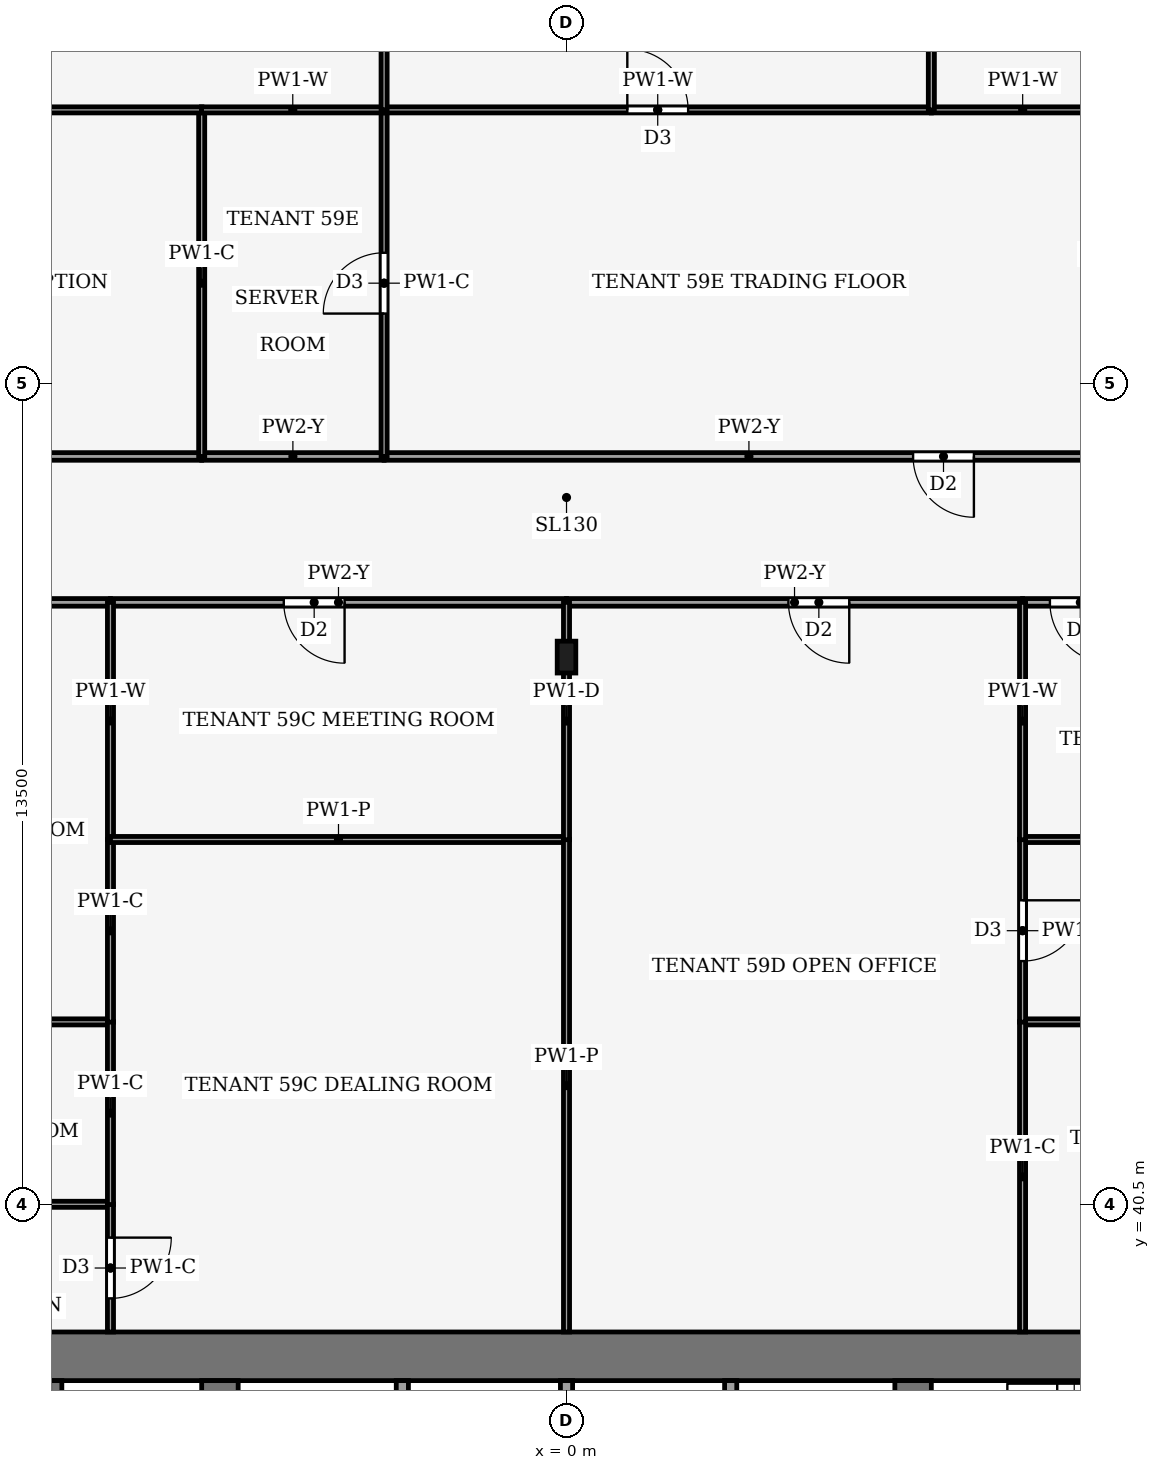
"""IFC4 building model, lengths in metres.
Left out: names, types, materials, properties, quantities, classifications, styles, units other than length and angle.
Written with IfcOpenShell. Run it as: python <this file> out.ifc"""

import sys

from ifc_helpers import new_model, si_unit, direction, frame, frame_2d, origin, origin_2d, place, context, subcontext, project, spatial, rectangle, i_section, extrude, element, fill, save


model = new_model("IFC4")
c1 = context("Model", 3, precision=1e-05, world=origin(), true_north=direction((0.0, 1.0)))
c2 = subcontext(c1, "Body", "Model", "MODEL_VIEW")
j1 = project(units=[si_unit("LENGTHUNIT", "METRE"), si_unit("PLANEANGLEUNIT", "RADIAN")], contexts=[c1])
p1 = place(None, origin())
s1 = spatial("IfcSite", under=j1, at=p1, CompositionType="ELEMENT")
p2 = place(p1, origin())
s2 = spatial("IfcBuilding", under=s1, at=p2, CompositionType="ELEMENT")
p3 = place(p2, frame((0.0, 0.0, 258.0)))
s3 = spatial("IfcBuildingStorey", under=s2, at=p3, CompositionType="ELEMENT", Elevation=258.0)
p4 = place(p3, frame((-13.4, 38.0, -0.13), z_axis=(0.0, 0.0, 1.0), x_axis=(1.0, 0.0, 0.0)))
e1 = element("IfcWall", 1, at=p4, inside=s3, PredefinedType="SHEAR", context=c2, shape_type="SweptSolid", body=[
    extrude(rectangle(XDim=26.8, YDim=0.8, at=frame_2d((13.4, 0.0))), origin(), (0.0, 0.0, 1.0), 4.0),
])
p5 = place(p3, frame((-5.7, 18.4, -0.13), z_axis=(0.0, 0.0, 1.0), x_axis=(0.0, 1.0, 0.0)))
e2 = element("IfcWall", 2, at=p5, inside=s3, PredefinedType="SHEAR", context=c2, shape_type="SweptSolid", body=[
    extrude(rectangle(XDim=19.2, YDim=0.6, at=frame_2d((9.6, 0.0))), origin(), (0.0, 0.0, 1.0), 4.0),
])
p6 = place(p5, frame((8.35, 0.0, 0.13)))
e3 = element("IfcOpeningElement", 3, at=p6, cuts=e2, PredefinedType="OPENING", context=c2, shape_type="SweptSolid", body=[
    extrude(rectangle(XDim=0.9, YDim=2.1, at=frame_2d((0.45, 1.05))), frame((0.0, 0.31, 0.0), z_axis=(0.0, -1.0, 0.0), x_axis=(1.0, 0.0, 0.0)), (0.0, 0.0, 1.0), 0.62),
])
p7 = place(p3, frame((5.7, 18.4, -0.13), z_axis=(0.0, 0.0, 1.0), x_axis=(0.0, 1.0, 0.0)))
e4 = element("IfcWall", 4, at=p7, inside=s3, PredefinedType="SHEAR", context=c2, shape_type="SweptSolid", body=[
    extrude(rectangle(XDim=19.2, YDim=0.6, at=frame_2d((9.6, 0.0))), origin(), (0.0, 0.0, 1.0), 4.0),
])
p8 = place(p7, frame((8.35, 0.0, 0.13)))
e5 = element("IfcOpeningElement", 5, at=p8, cuts=e4, PredefinedType="OPENING", context=c2, shape_type="SweptSolid", body=[
    extrude(rectangle(XDim=0.9, YDim=2.1, at=frame_2d((0.45, 1.05))), frame((0.0, 0.31, 0.0), z_axis=(0.0, -1.0, 0.0), x_axis=(1.0, 0.0, 0.0)), (0.0, 0.0, 1.0), 0.62),
])
p9 = place(p7, frame((13.3, 0.0, 0.13)))
e6 = element("IfcOpeningElement", 6, at=p9, cuts=e4, PredefinedType="OPENING", context=c2, shape_type="SweptSolid", body=[
    extrude(rectangle(XDim=2.4, YDim=2.4, at=frame_2d((1.2, 1.2))), frame((0.0, 0.31, 0.0), z_axis=(0.0, -1.0, 0.0), x_axis=(1.0, 0.0, 0.0)), (0.0, 0.0, 1.0), 0.62),
])
p10 = place(p3, frame((0.0, 49.5, 0.0), z_axis=(0.0, 0.0, 1.0), x_axis=(1.0, 0.0, 0.0)))
e7 = element("IfcColumn", 7, at=p10, inside=s3, PredefinedType="COLUMN", context=c2, shape_type="SweptSolid", body=[
    extrude(i_section(OverallWidth=0.306, OverallDepth=0.524, WebThickness=0.012, FlangeThickness=0.04, FilletRadius=0.027, at=origin_2d()), origin(), (0.0, 0.0, 1.0), 4.0),
])
for number, where, z_axis, x_axis in (
    (8, (-8.4, 34.0, 0.0), (0.0, 0.0, 1.0), (0.0, 1.0, 0.0)),
    (9, (-2.7, 34.0, 0.0), (0.0, 0.0, 1.0), (0.0, 1.0, 0.0)),
    (10, (0.0, 34.0, 0.0), (0.0, 0.0, 1.0), (0.0, 1.0, 0.0)),
    (11, (2.7, 34.0, 0.0), (0.0, 0.0, 1.0), (0.0, 1.0, 0.0)),
):
    element("IfcWall", number, at=place(p3, frame(where, z_axis=z_axis, x_axis=x_axis)), inside=s3, PredefinedType="PARTITIONING", context=c2, shape_type="SweptSolid", body=[
        extrude(rectangle(XDim=3.6, YDim=0.2, at=frame_2d((1.8, 0.0))), origin(), (0.0, 0.0, 1.0), 3.87),
    ])
p11 = place(p3, frame((-7.5, 50.4, 0.0), z_axis=(0.0, 0.0, 1.0), x_axis=(-1.0, 0.0, 0.0)))
e12 = element("IfcWall", 12, at=p11, inside=s3, PredefinedType="PARTITIONING", context=c2, shape_type="SweptSolid", body=[
    extrude(rectangle(XDim=5.9, YDim=0.125, at=frame_2d((2.95, 0.0))), origin(), (0.0, 0.0, 1.0), 3.24),
])
p12 = place(p3, frame((0.0, 50.4, 0.0), z_axis=(0.0, 0.0, 1.0), x_axis=(-1.0, 0.0, 0.0)))
e13 = element("IfcWall", 13, at=p12, inside=s3, PredefinedType="PARTITIONING", context=c2, shape_type="SweptSolid", body=[
    extrude(rectangle(XDim=7.5, YDim=0.125, at=frame_2d((3.75, 0.0))), origin(), (0.0, 0.0, 1.0), 3.24),
])
p13 = place(p12, frame((3.65, 0.0, 0.0)))
e14 = element("IfcOpeningElement", 14, at=p13, cuts=e13, PredefinedType="OPENING", context=c2, shape_type="SweptSolid", body=[
    extrude(rectangle(XDim=1.0, YDim=2.1, at=frame_2d((0.5, 1.05))), frame((0.0, 0.073, 0.0), z_axis=(0.0, -1.0, 0.0), x_axis=(1.0, 0.0, 0.0)), (0.0, 0.0, 1.0), 0.145),
])
p14 = place(p3, frame((13.4, 50.4, 0.0), z_axis=(0.0, 0.0, 1.0), x_axis=(-1.0, 0.0, 0.0)))
e15 = element("IfcWall", 15, at=p14, inside=s3, PredefinedType="PARTITIONING", context=c2, shape_type="SweptSolid", body=[
    extrude(rectangle(XDim=5.9, YDim=0.125, at=frame_2d((2.95, 0.0))), origin(), (0.0, 0.0, 1.0), 3.24),
])
p15 = place(p14, frame((4.45, 0.0, 0.0)))
e16 = element("IfcOpeningElement", 16, at=p15, cuts=e15, PredefinedType="OPENING", context=c2, shape_type="SweptSolid", body=[
    extrude(rectangle(XDim=1.0, YDim=2.1, at=frame_2d((0.5, 1.05))), frame((0.0, 0.073, 0.0), z_axis=(0.0, -1.0, 0.0), x_axis=(1.0, 0.0, 0.0)), (0.0, 0.0, 1.0), 0.145),
])
p16 = place(p3, frame((7.5, 50.4, 0.0), z_axis=(0.0, 0.0, 1.0), x_axis=(-1.0, 0.0, 0.0)))
e17 = element("IfcWall", 17, at=p16, inside=s3, PredefinedType="PARTITIONING", context=c2, shape_type="SweptSolid", body=[
    extrude(rectangle(XDim=7.5, YDim=0.125, at=frame_2d((3.75, 0.0))), origin(), (0.0, 0.0, 1.0), 3.24),
])
p17 = place(p16, frame((2.85, 0.0, 0.0)))
e18 = element("IfcOpeningElement", 18, at=p17, cuts=e17, PredefinedType="OPENING", context=c2, shape_type="SweptSolid", body=[
    extrude(rectangle(XDim=1.0, YDim=2.1, at=frame_2d((0.5, 1.05))), frame((0.0, 0.073, 0.0), z_axis=(0.0, -1.0, 0.0), x_axis=(1.0, 0.0, 0.0)), (0.0, 0.0, 1.0), 0.145),
])
p18 = place(p3, frame((-13.4, 52.8, 0.0), z_axis=(0.0, 0.0, 1.0), x_axis=(1.0, 0.0, 0.0)))
e19 = element("IfcWall", 19, at=p18, inside=s3, PredefinedType="PARTITIONING", context=c2, shape_type="SweptSolid", body=[
    extrude(rectangle(XDim=7.4, YDim=0.125, at=frame_2d((3.7, 0.0))), origin(), (0.0, 0.0, 1.0), 3.24),
])
p19 = place(p18, frame((3.2, 0.0, 0.0)))
e20 = element("IfcOpeningElement", 20, at=p19, cuts=e19, PredefinedType="OPENING", context=c2, shape_type="SweptSolid", body=[
    extrude(rectangle(XDim=1.0, YDim=2.1, at=frame_2d((0.5, 1.05))), frame((0.0, 0.073, 0.0), z_axis=(0.0, -1.0, 0.0), x_axis=(1.0, 0.0, 0.0)), (0.0, 0.0, 1.0), 0.145),
])
p20 = place(p3, frame((-3.0, 52.8, 0.0), z_axis=(0.0, 0.0, 1.0), x_axis=(-1.0, 0.0, 0.0)))
e21 = element("IfcWall", 21, at=p20, inside=s3, PredefinedType="PARTITIONING", context=c2, shape_type="SweptSolid", body=[
    extrude(rectangle(XDim=3.0, YDim=0.125, at=frame_2d((1.5, 0.0))), origin(), (0.0, 0.0, 1.0), 3.24),
])
p21 = place(p3, frame((9.0, 52.8, 0.0), z_axis=(0.0, 0.0, 1.0), x_axis=(-1.0, 0.0, 0.0)))
e22 = element("IfcWall", 22, at=p21, inside=s3, PredefinedType="PARTITIONING", context=c2, shape_type="SweptSolid", body=[
    extrude(rectangle(XDim=12.0, YDim=0.125, at=frame_2d((6.0, 0.0))), origin(), (0.0, 0.0, 1.0), 3.24),
])
p22 = place(p21, frame((2.3, 0.0, 0.0)))
e23 = element("IfcOpeningElement", 23, at=p22, cuts=e22, PredefinedType="OPENING", context=c2, shape_type="SweptSolid", body=[
    extrude(rectangle(XDim=1.0, YDim=2.1, at=frame_2d((0.5, 1.05))), frame((0.0, 0.073, 0.0), z_axis=(0.0, -1.0, 0.0), x_axis=(1.0, 0.0, 0.0)), (0.0, 0.0, 1.0), 0.145),
])
p23 = place(p3, frame((-13.4, 40.5, 0.0), z_axis=(0.0, 0.0, 1.0), x_axis=(1.0, 0.0, 0.0)))
e24 = element("IfcWall", 24, at=p23, inside=s3, PredefinedType="PARTITIONING", context=c2, shape_type="SweptSolid", body=[
    extrude(rectangle(XDim=5.9, YDim=0.1, at=frame_2d((2.95, 0.0))), origin(), (0.0, 0.0, 1.0), 3.44),
])
p24 = place(p23, frame((2.45, 0.0, 0.0)))
e25 = element("IfcOpeningElement", 25, at=p24, cuts=e24, PredefinedType="OPENING", context=c2, shape_type="SweptSolid", body=[
    extrude(rectangle(XDim=1.0, YDim=2.1, at=frame_2d((0.5, 1.05))), frame((0.0, 0.06, 0.0), z_axis=(0.0, -1.0, 0.0), x_axis=(1.0, 0.0, 0.0)), (0.0, 0.0, 1.0), 0.12),
])
p25 = place(p3, frame((-7.5, 40.504, 0.0), z_axis=(0.0, 0.0, 1.0), x_axis=(0.0, -1.0, 0.0)))
e26 = element("IfcWall", 26, at=p25, inside=s3, PredefinedType="PARTITIONING", context=c2, shape_type="SweptSolid", body=[
    extrude(rectangle(XDim=2.104, YDim=0.1, at=frame_2d((1.052, 0.0))), origin(), (0.0, 0.0, 1.0), 3.87),
])
p26 = place(p25, frame((0.552, 0.0, 0.0)))
e27 = element("IfcOpeningElement", 27, at=p26, cuts=e26, PredefinedType="OPENING", context=c2, shape_type="SweptSolid", body=[
    extrude(rectangle(XDim=1.0, YDim=2.1, at=frame_2d((0.5, 1.05))), frame((0.0, 0.06, 0.0), z_axis=(0.0, -1.0, 0.0), x_axis=(1.0, 0.0, 0.0)), (0.0, 0.0, 1.0), 0.12),
])
p27 = place(p3, frame((-7.5, 43.5, 0.0), z_axis=(0.0, 0.0, 1.0), x_axis=(-1.0, 0.0, 0.0)))
e28 = element("IfcWall", 28, at=p27, inside=s3, PredefinedType="PARTITIONING", context=c2, shape_type="SweptSolid", body=[
    extrude(rectangle(XDim=5.9, YDim=0.1, at=frame_2d((2.95, 0.0))), origin(), (0.0, 0.0, 1.0), 3.44),
])
p28 = place(p3, frame((-7.5, 40.496, 0.0), z_axis=(0.0, 0.0, 1.0), x_axis=(0.0, 1.0, 0.0)))
e29 = element("IfcWall", 29, at=p28, inside=s3, PredefinedType="PARTITIONING", context=c2, shape_type="SweptSolid", body=[
    extrude(rectangle(XDim=3.008, YDim=0.1, at=frame_2d((1.504, 0.0))), origin(), (0.0, 0.0, 1.0), 3.87),
])
p29 = place(p3, frame((-7.5, 43.496, 0.0), z_axis=(0.0, 0.0, 1.0), x_axis=(0.0, 1.0, 0.0)))
e30 = element("IfcWall", 30, at=p29, inside=s3, PredefinedType="PARTITIONING", context=c2, shape_type="SweptSolid", body=[
    extrude(rectangle(XDim=3.004, YDim=0.1, at=frame_2d((1.502, 0.0))), origin(), (0.0, 0.0, 1.0), 3.87),
])
p30 = place(p3, frame((-7.5, 46.5, 0.0), z_axis=(0.0, 0.0, 1.0), x_axis=(0.0, 1.0, 0.0)))
e31 = element("IfcWall", 31, at=p30, inside=s3, PredefinedType="PARTITIONING", context=c2, shape_type="SweptSolid", body=[
    extrude(rectangle(XDim=3.9, YDim=0.1, at=frame_2d((1.95, 0.0))), origin(), (0.0, 0.0, 1.0), 3.24),
])
p31 = place(p3, frame((0.0, 46.5, 0.0), z_axis=(0.0, 0.0, 1.0), x_axis=(-1.0, 0.0, 0.0)))
e32 = element("IfcWall", 32, at=p31, inside=s3, PredefinedType="PARTITIONING", context=c2, shape_type="SweptSolid", body=[
    extrude(rectangle(XDim=7.5, YDim=0.1, at=frame_2d((3.75, 0.0))), origin(), (0.0, 0.0, 1.0), 3.44),
])
p32 = place(p3, frame((0.0, 38.4, 0.0), z_axis=(0.0, 0.0, 1.0), x_axis=(0.0, 1.0, 0.0)))
e33 = element("IfcWall", 33, at=p32, inside=s3, PredefinedType="PARTITIONING", context=c2, shape_type="SweptSolid", body=[
    extrude(rectangle(XDim=8.104, YDim=0.1, at=frame_2d((4.052, 0.0))), origin(), (0.0, 0.0, 1.0), 3.44),
])
p33 = place(p3, frame((0.0, 46.496, 0.0), z_axis=(0.0, 0.0, 1.0), x_axis=(0.0, 1.0, 0.0)))
e34 = element("IfcWall", 34, at=p33, inside=s3, PredefinedType="PARTITIONING", context=c2, shape_type="SweptSolid", body=[
    extrude(rectangle(XDim=3.904, YDim=0.1, at=frame_2d((1.952, 0.0))), origin(), (0.0, 0.0, 1.0), 3.29),
])
p34 = place(p3, frame((13.4, 43.5, 0.0), z_axis=(0.0, 0.0, 1.0), x_axis=(-1.0, 0.0, 0.0)))
e35 = element("IfcWall", 35, at=p34, inside=s3, PredefinedType="PARTITIONING", context=c2, shape_type="SweptSolid", body=[
    extrude(rectangle(XDim=5.9, YDim=0.1, at=frame_2d((2.95, 0.0))), origin(), (0.0, 0.0, 1.0), 3.44),
])
p35 = place(p3, frame((7.5, 43.504, 0.0), z_axis=(0.0, 0.0, 1.0), x_axis=(0.0, -1.0, 0.0)))
e36 = element("IfcWall", 36, at=p35, inside=s3, PredefinedType="PARTITIONING", context=c2, shape_type="SweptSolid", body=[
    extrude(rectangle(XDim=5.104, YDim=0.1, at=frame_2d((2.552, 0.0))), origin(), (0.0, 0.0, 1.0), 3.87),
])
p36 = place(p3, frame((13.4, 46.5, 0.0), z_axis=(0.0, 0.0, 1.0), x_axis=(-1.0, 0.0, 0.0)))
e37 = element("IfcWall", 37, at=p36, inside=s3, PredefinedType="PARTITIONING", context=c2, shape_type="SweptSolid", body=[
    extrude(rectangle(XDim=5.9, YDim=0.1, at=frame_2d((2.95, 0.0))), origin(), (0.0, 0.0, 1.0), 3.44),
])
p37 = place(p3, frame((7.5, 46.504, 0.0), z_axis=(0.0, 0.0, 1.0), x_axis=(0.0, -1.0, 0.0)))
e38 = element("IfcWall", 38, at=p37, inside=s3, PredefinedType="PARTITIONING", context=c2, shape_type="SweptSolid", body=[
    extrude(rectangle(XDim=3.008, YDim=0.1, at=frame_2d((1.504, 0.0))), origin(), (0.0, 0.0, 1.0), 3.87),
])
p38 = place(p37, frame((1.004, 0.0, 0.0)))
e39 = element("IfcOpeningElement", 39, at=p38, cuts=e38, PredefinedType="OPENING", context=c2, shape_type="SweptSolid", body=[
    extrude(rectangle(XDim=1.0, YDim=2.1, at=frame_2d((0.5, 1.05))), frame((0.0, 0.06, 0.0), z_axis=(0.0, -1.0, 0.0), x_axis=(1.0, 0.0, 0.0)), (0.0, 0.0, 1.0), 0.12),
])
p39 = place(p3, frame((7.5, 50.4, 0.0), z_axis=(0.0, 0.0, 1.0), x_axis=(0.0, -1.0, 0.0)))
e40 = element("IfcWall", 40, at=p39, inside=s3, PredefinedType="PARTITIONING", context=c2, shape_type="SweptSolid", body=[
    extrude(rectangle(XDim=3.904, YDim=0.1, at=frame_2d((1.952, 0.0))), origin(), (0.0, 0.0, 1.0), 3.24),
])
p40 = place(p3, frame((-6.0, 52.8, 0.0), z_axis=(0.0, 0.0, 1.0), x_axis=(0.0, 1.0, 0.0)))
e41 = element("IfcWall", 41, at=p40, inside=s3, PredefinedType="PARTITIONING", context=c2, shape_type="SweptSolid", body=[
    extrude(rectangle(XDim=5.7, YDim=0.1, at=frame_2d((2.85, 0.0))), origin(), (0.0, 0.0, 1.0), 3.87),
])
p41 = place(p3, frame((-5.996, 58.5, 0.0), z_axis=(0.0, 0.0, 1.0), x_axis=(-1.0, 0.0, 0.0)))
e42 = element("IfcWall", 42, at=p41, inside=s3, PredefinedType="PARTITIONING", context=c2, shape_type="SweptSolid", body=[
    extrude(rectangle(XDim=7.404, YDim=0.1, at=frame_2d((3.702, 0.0))), origin(), (0.0, 0.0, 1.0), 3.24),
])
p42 = place(p3, frame((-3.0, 52.8, 0.0), z_axis=(0.0, 0.0, 1.0), x_axis=(0.0, 1.0, 0.0)))
e43 = element("IfcWall", 43, at=p42, inside=s3, PredefinedType="PARTITIONING", context=c2, shape_type="SweptSolid", body=[
    extrude(rectangle(XDim=5.7, YDim=0.1, at=frame_2d((2.85, 0.0))), origin(), (0.0, 0.0, 1.0), 3.87),
])
p43 = place(p42, frame((2.35, 0.0, 0.0)))
e44 = element("IfcOpeningElement", 44, at=p43, cuts=e43, PredefinedType="OPENING", context=c2, shape_type="SweptSolid", body=[
    extrude(rectangle(XDim=1.0, YDim=2.1, at=frame_2d((0.5, 1.05))), frame((0.0, 0.06, 0.0), z_axis=(0.0, -1.0, 0.0), x_axis=(1.0, 0.0, 0.0)), (0.0, 0.0, 1.0), 0.12),
])
p44 = place(p3, frame((-3.0, 58.5, 0.0), z_axis=(0.0, 0.0, 1.0), x_axis=(-1.0, 0.0, 0.0)))
e45 = element("IfcWall", 45, at=p44, inside=s3, PredefinedType="PARTITIONING", context=c2, shape_type="SweptSolid", body=[
    extrude(rectangle(XDim=3.004, YDim=0.1, at=frame_2d((1.502, 0.0))), origin(), (0.0, 0.0, 1.0), 3.24),
])
p45 = place(p3, frame((-3.0, 58.5, 0.0), z_axis=(0.0, 0.0, 1.0), x_axis=(1.0, 0.0, 0.0)))
e46 = element("IfcWall", 46, at=p45, inside=s3, PredefinedType="PARTITIONING", context=c2, shape_type="SweptSolid", body=[
    extrude(rectangle(XDim=9.0, YDim=0.1, at=frame_2d((4.5, 0.0))), origin(), (0.0, 0.0, 1.0), 3.24),
])
p46 = place(p45, frame((4.0, 0.0, 0.0)))
e47 = element("IfcOpeningElement", 47, at=p46, cuts=e46, PredefinedType="OPENING", context=c2, shape_type="SweptSolid", body=[
    extrude(rectangle(XDim=1.0, YDim=2.1, at=frame_2d((0.5, 1.05))), frame((0.0, 0.06, 0.0), z_axis=(0.0, -1.0, 0.0), x_axis=(1.0, 0.0, 0.0)), (0.0, 0.0, 1.0), 0.12),
])
p47 = place(p3, frame((9.004, 58.5, 0.0), z_axis=(0.0, 0.0, 1.0), x_axis=(-1.0, 0.0, 0.0)))
e48 = element("IfcWall", 48, at=p47, inside=s3, PredefinedType="PARTITIONING", context=c2, shape_type="SweptSolid", body=[
    extrude(rectangle(XDim=3.004, YDim=0.1, at=frame_2d((1.502, 0.0))), origin(), (0.0, 0.0, 1.0), 3.24),
])
p48 = place(p3, frame((-3.0, 58.5, 0.0), z_axis=(0.0, 0.0, 1.0), x_axis=(0.0, 1.0, 0.0)))
e49 = element("IfcWall", 49, at=p48, inside=s3, PredefinedType="PARTITIONING", context=c2, shape_type="SweptSolid", body=[
    extrude(rectangle(XDim=9.33, YDim=0.1, at=frame_2d((4.665, 0.0))), origin(), (0.0, 0.0, 1.0), 3.04),
])
p49 = place(p3, frame((6.0, 58.5, 0.0), z_axis=(0.0, 0.0, 1.0), x_axis=(0.0, 1.0, 0.0)))
e50 = element("IfcWall", 50, at=p49, inside=s3, PredefinedType="PARTITIONING", context=c2, shape_type="SweptSolid", body=[
    extrude(rectangle(XDim=9.58, YDim=0.1, at=frame_2d((4.79, 0.0))), origin(), (0.0, 0.0, 1.0), 3.04),
])
p50 = place(p13, origin())
e51 = element("IfcDoor", 51, at=p50, inside=s3, OperationType="SINGLE_SWING_RIGHT", PredefinedType="DOOR", context=c2, shape_type="SweptSolid", body=[
    extrude(rectangle(XDim=1.0, YDim=2.1, at=frame_2d((0.5, 1.05))), frame((0.0, 0.025, 0.0), z_axis=(0.0, -1.0, 0.0), x_axis=(1.0, 0.0, 0.0)), (0.0, 0.0, 1.0), 0.05),
])
fill(e14, e51)
p51 = place(p15, origin())
e52 = element("IfcDoor", 52, at=p51, inside=s3, OperationType="SINGLE_SWING_RIGHT", PredefinedType="DOOR", context=c2, shape_type="SweptSolid", body=[
    extrude(rectangle(XDim=1.0, YDim=2.1, at=frame_2d((0.5, 1.05))), frame((0.0, 0.025, 0.0), z_axis=(0.0, -1.0, 0.0), x_axis=(1.0, 0.0, 0.0)), (0.0, 0.0, 1.0), 0.05),
])
fill(e16, e52)
p52 = place(p17, origin())
e53 = element("IfcDoor", 53, at=p52, inside=s3, OperationType="SINGLE_SWING_LEFT", PredefinedType="DOOR", context=c2, shape_type="SweptSolid", body=[
    extrude(rectangle(XDim=1.0, YDim=2.1, at=frame_2d((0.5, 1.05))), frame((0.0, 0.025, 0.0), z_axis=(0.0, -1.0, 0.0), x_axis=(1.0, 0.0, 0.0)), (0.0, 0.0, 1.0), 0.05),
])
fill(e18, e53)
p53 = place(p22, origin())
e54 = element("IfcDoor", 54, at=p53, inside=s3, OperationType="SINGLE_SWING_LEFT", PredefinedType="DOOR", context=c2, shape_type="SweptSolid", body=[
    extrude(rectangle(XDim=1.0, YDim=2.1, at=frame_2d((0.5, 1.05))), frame((0.0, 0.025, 0.0), z_axis=(0.0, -1.0, 0.0), x_axis=(1.0, 0.0, 0.0)), (0.0, 0.0, 1.0), 0.05),
])
fill(e23, e54)
p54 = place(p26, origin())
e55 = element("IfcDoor", 55, at=p54, inside=s3, OperationType="SINGLE_SWING_RIGHT", PredefinedType="DOOR", context=c2, shape_type="SweptSolid", body=[
    extrude(rectangle(XDim=1.0, YDim=2.1, at=frame_2d((0.5, 1.05))), frame((0.0, 0.025, 0.0), z_axis=(0.0, -1.0, 0.0), x_axis=(1.0, 0.0, 0.0)), (0.0, 0.0, 1.0), 0.05),
])
fill(e27, e55)
p55 = place(p38, origin())
e56 = element("IfcDoor", 56, at=p55, inside=s3, OperationType="SINGLE_SWING_LEFT", PredefinedType="DOOR", context=c2, shape_type="SweptSolid", body=[
    extrude(rectangle(XDim=1.0, YDim=2.1, at=frame_2d((0.5, 1.05))), frame((0.0, 0.025, 0.0), z_axis=(0.0, -1.0, 0.0), x_axis=(1.0, 0.0, 0.0)), (0.0, 0.0, 1.0), 0.05),
])
fill(e39, e56)
p56 = place(p43, origin())
e57 = element("IfcDoor", 57, at=p56, inside=s3, OperationType="SINGLE_SWING_RIGHT", PredefinedType="DOOR", context=c2, shape_type="SweptSolid", body=[
    extrude(rectangle(XDim=1.0, YDim=2.1, at=frame_2d((0.5, 1.05))), frame((0.0, 0.025, 0.0), z_axis=(0.0, -1.0, 0.0), x_axis=(1.0, 0.0, 0.0)), (0.0, 0.0, 1.0), 0.05),
])
fill(e44, e57)
p57 = place(p46, origin())
e58 = element("IfcDoor", 58, at=p57, inside=s3, OperationType="SINGLE_SWING_LEFT", PredefinedType="DOOR", context=c2, shape_type="SweptSolid", body=[
    extrude(rectangle(XDim=1.0, YDim=2.1, at=frame_2d((0.5, 1.05))), frame((0.0, 0.025, 0.0), z_axis=(0.0, -1.0, 0.0), x_axis=(1.0, 0.0, 0.0)), (0.0, 0.0, 1.0), 0.05),
])
fill(e47, e58)
save(model, sys.argv[1])
